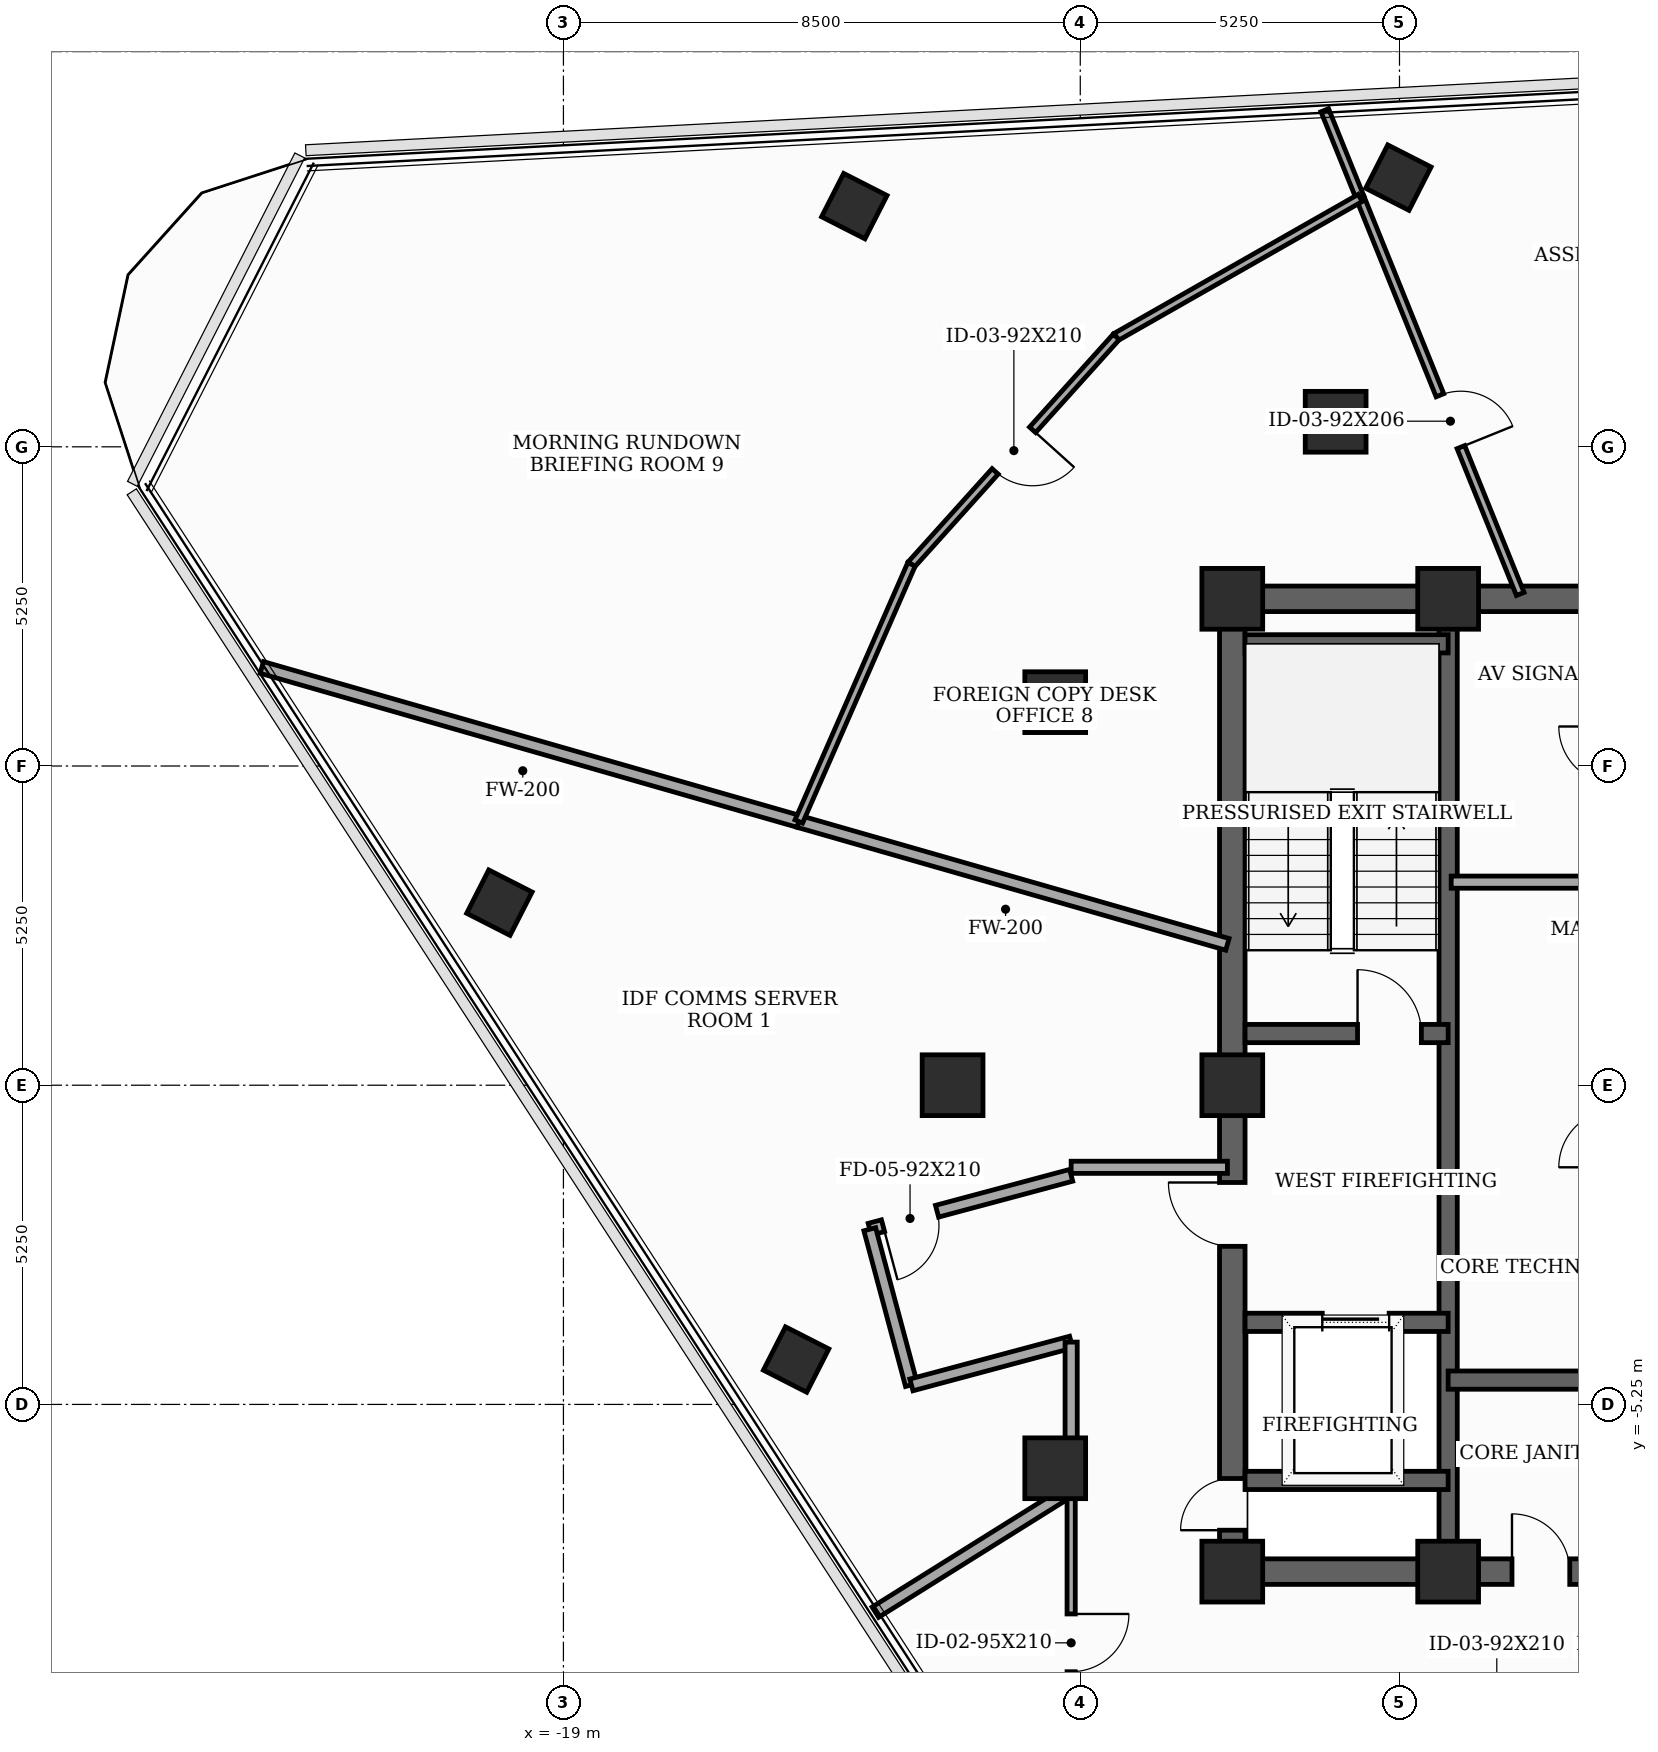
"""IFC4 building model, lengths in metres.
Left out: names, types, materials, properties, quantities, classifications, styles, units other than length and angle.
Written with IfcOpenShell. Run it as: python <this file> out.ifc"""

import sys

from ifc_helpers import new_model, si_unit, direction, frame, frame_2d, origin, origin_2d, place, context, subcontext, project, spatial, rectangle, extrude, element, fill, save


model = new_model("IFC4")
c1 = context("Model", 3, precision=1e-05, world=origin(), true_north=direction((0.0, 1.0)))
c2 = subcontext(c1, "Body", "Model", "MODEL_VIEW")
j1 = project(units=[si_unit("LENGTHUNIT", "METRE"), si_unit("PLANEANGLEUNIT", "RADIAN")], contexts=[c1])
p1 = place(None, origin())
s1 = spatial("IfcSite", under=j1, at=p1, CompositionType="ELEMENT")
p2 = place(p1, origin())
s2 = spatial("IfcBuilding", under=s1, at=p2, CompositionType="ELEMENT")
p3 = place(p2, frame((0.0, 0.0, 267.0)))
s3 = spatial("IfcBuildingStorey", under=s2, at=p3, CompositionType="ELEMENT", Elevation=267.0)
for number, where, z_axis, x_axis in (
    (1, (-8.0, -8.0, 0.0), (0.0, 0.0, 1.0), (1.0, 0.0, 0.0)),
    (2, (-4.45, -8.0, 0.0), (0.0, 0.0, 1.0), (1.0, 0.0, 0.0)),
    (3, (-4.45, 8.0, 0.0), (0.0, 0.0, 1.0), (1.0, 0.0, 0.0)),
    (4, (-8.0, 8.0, 0.0), (0.0, 0.0, 1.0), (1.0, 0.0, 0.0)),
    (5, (-8.0, 0.0, 0.0), (0.0, 0.0, 1.0), (1.0, 0.0, 0.0)),
    (6, (-6.3, 10.912, 0.0), (0.0, 0.0, 1.0), (1.0, 0.0, 0.0)),
    (7, (-10.912, 6.3, 0.0), (0.0, 0.0, 1.0), (1.0, 0.0, 0.0)),
    (8, (-12.6, 0.0, 0.0), (0.0, 0.0, 1.0), (1.0, 0.0, 0.0)),
    (9, (-10.912, -6.3, 0.0), (0.0, 0.0, 1.0), (1.0, 0.0, 0.0)),
):
    element("IfcColumn", number, at=place(p3, frame(where, z_axis=z_axis, x_axis=x_axis)), inside=s3, PredefinedType="COLUMN", context=c2, shape_type="SweptSolid", body=[
        extrude(rectangle(XDim=1.0, YDim=1.0, at=origin_2d()), origin(), (0.0, 0.0, 1.0), 3.7),
    ])
for number, where, z_axis, x_axis in (
    (10, (-5.269, 14.927, 0.0), (0.0, 0.0, 1.0), (0.454, 0.891, 0.0)),
    (11, (-14.216, 14.458, 0.0), (0.0, 0.0, 1.0), (0.454, 0.891, 0.0)),
    (12, (-20.053, 3.003, 0.0), (0.0, 0.0, 1.0), (0.454, 0.891, 0.0)),
    (13, (-15.173, -4.512, 0.0), (0.0, 0.0, 1.0), (0.454, 0.891, 0.0)),
):
    element("IfcColumn", number, at=place(p3, frame(where, z_axis=z_axis, x_axis=x_axis)), inside=s3, PredefinedType="COLUMN", context=c2, shape_type="SweptSolid", body=[
        extrude(rectangle(XDim=0.8, YDim=0.8, at=origin_2d()), origin(), (0.0, 0.0, 1.0), 3.7),
    ])
p4 = place(p3, frame((-8.0, -8.0, 0.0), z_axis=(0.0, 0.0, 1.0), x_axis=(0.0, 1.0, 0.0)))
e14 = element("IfcWall", 14, at=p4, inside=s3, PredefinedType="SHEAR", context=c2, shape_type="SweptSolid", body=[
    extrude(rectangle(XDim=16.0, YDim=0.42, at=frame_2d((8.0, 0.0))), origin(), (0.0, 0.0, 1.0), 3.5),
])
p5 = place(p4, frame((0.681, 0.0, 0.0)))
e15 = element("IfcOpeningElement", 15, at=p5, cuts=e14, PredefinedType="OPENING", context=c2, shape_type="SweptSolid", body=[
    extrude(rectangle(XDim=0.85, YDim=2.02, at=frame_2d((0.425, 1.01))), frame((0.0, 0.22, 0.0), z_axis=(0.0, -1.0, 0.0), x_axis=(1.0, 0.0, 0.0)), (0.0, 0.0, 1.0), 0.44),
])
p6 = place(p4, frame((5.35, 0.0, 0.0)))
e16 = element("IfcOpeningElement", 16, at=p6, cuts=e14, PredefinedType="OPENING", context=c2, shape_type="SweptSolid", body=[
    extrude(rectangle(XDim=1.05, YDim=2.15, at=frame_2d((0.525, 1.075))), frame((0.0, 0.22, 0.0), z_axis=(0.0, -1.0, 0.0), x_axis=(1.0, 0.0, 0.0)), (0.0, 0.0, 1.0), 0.44),
])
p7 = place(p3, frame((-8.0, -8.0, 0.0), z_axis=(0.0, 0.0, 1.0), x_axis=(1.0, 0.0, 0.0)))
e17 = element("IfcWall", 17, at=p7, inside=s3, PredefinedType="SHEAR", context=c2, shape_type="SweptSolid", body=[
    extrude(rectangle(XDim=16.0, YDim=0.42, at=frame_2d((8.0, 0.0))), origin(), (0.0, 0.0, 1.0), 3.5),
])
p8 = place(p7, frame((4.6, 0.0, 0.0)))
e18 = element("IfcOpeningElement", 18, at=p8, cuts=e17, PredefinedType="OPENING", context=c2, shape_type="SweptSolid", body=[
    extrude(rectangle(XDim=0.95, YDim=2.1, at=frame_2d((0.475, 1.05))), frame((0.0, 0.22, 0.0), z_axis=(0.0, -1.0, 0.0), x_axis=(1.0, 0.0, 0.0)), (0.0, 0.0, 1.0), 0.44),
])
p9 = place(p7, frame((7.52, 0.0, 0.0)))
e19 = element("IfcOpeningElement", 19, at=p9, cuts=e17, PredefinedType="OPENING", context=c2, shape_type="SweptSolid", body=[
    extrude(rectangle(XDim=0.95, YDim=2.1, at=frame_2d((0.475, 1.05))), frame((0.0, 0.22, 0.0), z_axis=(0.0, -1.0, 0.0), x_axis=(1.0, 0.0, 0.0)), (0.0, 0.0, 1.0), 0.44),
])
p10 = place(p7, frame((10.45, 0.0, 0.0)))
e20 = element("IfcOpeningElement", 20, at=p10, cuts=e17, PredefinedType="OPENING", context=c2, shape_type="SweptSolid", body=[
    extrude(rectangle(XDim=0.95, YDim=2.1, at=frame_2d((0.475, 1.05))), frame((0.0, 0.22, 0.0), z_axis=(0.0, -1.0, 0.0), x_axis=(1.0, 0.0, 0.0)), (0.0, 0.0, 1.0), 0.44),
])
p11 = place(p3, frame((-8.0, 8.0, 0.0), z_axis=(0.0, 0.0, 1.0), x_axis=(1.0, 0.0, 0.0)))
e21 = element("IfcWall", 21, at=p11, inside=s3, PredefinedType="SHEAR", context=c2, shape_type="SweptSolid", body=[
    extrude(rectangle(XDim=16.0, YDim=0.42, at=frame_2d((8.0, 0.0))), origin(), (0.0, 0.0, 1.0), 3.5),
])
p12 = place(p11, frame((7.1, 0.0, 0.0)))
e22 = element("IfcOpeningElement", 22, at=p12, cuts=e21, PredefinedType="OPENING", context=c2, shape_type="SweptSolid", body=[
    extrude(rectangle(XDim=1.8, YDim=2.15, at=frame_2d((0.9, 1.075))), frame((0.0, 0.22, 0.0), z_axis=(0.0, -1.0, 0.0), x_axis=(1.0, 0.0, 0.0)), (0.0, 0.0, 1.0), 0.44),
])
p13 = place(p3, frame((-4.45, -7.79, 0.0), z_axis=(0.0, 0.0, 1.0), x_axis=(0.0, 1.0, 0.0)))
e23 = element("IfcWall", 23, at=p13, inside=s3, PredefinedType="SHEAR", context=c2, shape_type="SweptSolid", body=[
    extrude(rectangle(XDim=15.58, YDim=0.3, at=frame_2d((7.79, 0.0))), origin(), (0.0, 0.0, 1.0), 3.5),
])
p14 = place(p3, frame((-7.79, 0.85, 0.0), z_axis=(0.0, 0.0, 1.0), x_axis=(1.0, 0.0, 0.0)))
e24 = element("IfcWall", 24, at=p14, inside=s3, PredefinedType="SHEAR", context=c2, shape_type="SweptSolid", body=[
    extrude(rectangle(XDim=3.34, YDim=0.3, at=frame_2d((1.67, 0.0))), origin(), (0.0, 0.0, 1.0), 3.5),
])
p15 = place(p14, frame((1.85, 0.0, 0.0)))
e25 = element("IfcOpeningElement", 25, at=p15, cuts=e24, PredefinedType="OPENING", context=c2, shape_type="SweptSolid", body=[
    extrude(rectangle(XDim=1.05, YDim=2.15, at=frame_2d((0.525, 1.075))), frame((0.0, 0.16, 0.0), z_axis=(0.0, -1.0, 0.0), x_axis=(1.0, 0.0, 0.0)), (0.0, 0.0, 1.0), 0.32),
])
p16 = place(p3, frame((-7.79, 7.26, 0.0), z_axis=(0.0, 0.0, 1.0), x_axis=(1.0, 0.0, 0.0)))
e26 = element("IfcWall", 26, at=p16, inside=s3, PredefinedType="SHEAR", context=c2, shape_type="SweptSolid", body=[
    extrude(rectangle(XDim=3.34, YDim=0.3, at=frame_2d((1.67, 0.0))), origin(), (0.0, 0.0, 1.0), 3.5),
])
p17 = place(p3, frame((-7.79, -3.9, 0.0), z_axis=(0.0, 0.0, 1.0), x_axis=(1.0, 0.0, 0.0)))
e27 = element("IfcWall", 27, at=p17, inside=s3, PredefinedType="SHEAR", context=c2, shape_type="SweptSolid", body=[
    extrude(rectangle(XDim=3.34, YDim=0.3, at=frame_2d((1.67, 0.0))), origin(), (0.0, 0.0, 1.0), 3.5),
])
p18 = place(p17, frame((1.27, 0.0, 0.0)))
e28 = element("IfcOpeningElement", 28, at=p18, cuts=e27, PredefinedType="OPENING", context=c2, shape_type="SweptSolid", body=[
    extrude(rectangle(XDim=1.1, YDim=2.1, at=frame_2d((0.55, 1.05))), frame((0.0, 0.16, 0.0), z_axis=(0.0, -1.0, 0.0), x_axis=(1.0, 0.0, 0.0)), (0.0, 0.0, 1.0), 0.32),
])
p19 = place(p3, frame((-7.79, -6.5, 0.0), z_axis=(0.0, 0.0, 1.0), x_axis=(1.0, 0.0, 0.0)))
e29 = element("IfcWall", 29, at=p19, inside=s3, PredefinedType="SHEAR", context=c2, shape_type="SweptSolid", body=[
    extrude(rectangle(XDim=3.34, YDim=0.3, at=frame_2d((1.67, 0.0))), origin(), (0.0, 0.0, 1.0), 3.5),
])
p20 = place(p3, frame((-4.45, -4.85, 0.0), z_axis=(0.0, 0.0, 1.0), x_axis=(1.0, 0.0, 0.0)))
e30 = element("IfcWall", 30, at=p20, inside=s3, PredefinedType="SHEAR", context=c2, shape_type="SweptSolid", body=[
    extrude(rectangle(XDim=8.9, YDim=0.3, at=frame_2d((4.45, 0.0))), origin(), (0.0, 0.0, 1.0), 3.5),
])
p21 = place(p3, frame((-4.4, 3.34, 0.0), z_axis=(0.0, 0.0, 1.0), x_axis=(1.0, 0.0, 0.0)))
e31 = element("IfcWall", 31, at=p21, inside=s3, PredefinedType="SOLIDWALL", context=c2, shape_type="SweptSolid", body=[
    extrude(rectangle(XDim=2.68, YDim=0.2, at=frame_2d((1.34, 0.0))), origin(), (0.0, 0.0, 1.0), 3.5),
])
p22 = place(p3, frame((-8.08, -1.35, 0.0), z_axis=(0.0, 0.0, 1.0), x_axis=(-1.0, 0.0, 0.0)))
e32 = element("IfcWall", 32, at=p22, inside=s3, PredefinedType="SOLIDWALL", context=c2, shape_type="SweptSolid", body=[
    extrude(rectangle(XDim=2.57, YDim=0.2, at=frame_2d((1.285, 0.0))), origin(), (0.0, 0.0, 1.0), 2.885),
])
p23 = place(p3, frame((-10.65, -1.482, 0.0), z_axis=(0.0, 0.0, 1.0), x_axis=(-0.965961397105, -0.2586862565, 0.0)))
e33 = element("IfcWall", 33, at=p23, inside=s3, PredefinedType="SOLIDWALL", context=c2, shape_type="SweptSolid", body=[
    extrude(rectangle(XDim=3.429, YDim=0.2, at=frame_2d((1.714, 0.0))), origin(), (0.0, 0.0, 1.0), 2.885),
])
p24 = place(p23, frame((2.283, 0.0, 0.0)))
e34 = element("IfcOpeningElement", 34, at=p24, cuts=e33, PredefinedType="OPENING", context=c2, shape_type="SweptSolid", body=[
    extrude(rectangle(XDim=0.92, YDim=2.1, at=frame_2d((0.46, 1.05))), frame((0.0, 0.11, 0.0), z_axis=(0.0, -1.0, 0.0), x_axis=(1.0, 0.0, 0.0)), (0.0, 0.0, 1.0), 0.22),
])
p25 = place(p3, frame((-13.962, -2.369, 0.0), z_axis=(0.0, 0.0, 1.0), x_axis=(0.258413725385, -0.966034340245, 0.0)))
e35 = element("IfcWall", 35, at=p25, inside=s3, PredefinedType="SOLIDWALL", context=c2, shape_type="SweptSolid", body=[
    extrude(rectangle(XDim=2.65, YDim=0.2, at=frame_2d((1.325, 0.0))), origin(), (0.0, 0.0, 1.0), 3.5),
])
p26 = place(p3, frame((-13.277, -4.929, 0.0), z_axis=(0.0, 0.0, 1.0), x_axis=(0.965934830229, 0.258785439601, 0.0)))
e36 = element("IfcWall", 36, at=p26, inside=s3, PredefinedType="SOLIDWALL", context=c2, shape_type="SweptSolid", body=[
    extrude(rectangle(XDim=2.72, YDim=0.2, at=frame_2d((1.36, 0.0))), origin(), (0.0, 0.0, 1.0), 2.885),
])
p27 = place(p3, frame((-10.65, -4.225, 0.0), z_axis=(0.0, 0.0, 1.0), x_axis=(0.0, -1.0, 0.0)))
e37 = element("IfcWall", 37, at=p27, inside=s3, PredefinedType="SOLIDWALL", context=c2, shape_type="SweptSolid", body=[
    extrude(rectangle(XDim=2.43, YDim=0.2, at=frame_2d((1.215, 0.0))), origin(), (0.0, 0.0, 1.0), 2.885),
])
p28 = place(p3, frame((-10.65, -6.655, 0.0), z_axis=(0.0, 0.0, 1.0), x_axis=(0.0, -1.0, 0.0)))
e38 = element("IfcWall", 38, at=p28, inside=s3, PredefinedType="PARTITIONING", context=c2, shape_type="SweptSolid", body=[
    extrude(rectangle(XDim=3.495, YDim=0.135, at=frame_2d((1.748, 0.0))), origin(), (0.0, 0.0, 1.0), 2.885),
])
p29 = place(p28, frame((2.042, 0.0, 0.0)))
e39 = element("IfcOpeningElement", 39, at=p29, cuts=e38, PredefinedType="OPENING", context=c2, shape_type="SweptSolid", body=[
    extrude(rectangle(XDim=0.95, YDim=2.1, at=frame_2d((0.475, 1.05))), frame((0.0, 0.077, 0.0), z_axis=(0.0, -1.0, 0.0), x_axis=(1.0, 0.0, 0.0)), (0.0, 0.0, 1.0), 0.155),
])
p30 = place(p3, frame((-13.87, -8.667, 0.0), z_axis=(0.0, 0.0, 1.0), x_axis=(0.848059708933, 0.529900679454, 0.0)))
e40 = element("IfcWall", 40, at=p30, inside=s3, PredefinedType="SOLIDWALL", context=c2, shape_type="SweptSolid", body=[
    extrude(rectangle(XDim=3.797, YDim=0.2, at=frame_2d((1.898, 0.0))), origin(), (0.0, 0.0, 1.0), 2.885),
])
p31 = place(p3, frame((-8.08, 2.317, 0.0), z_axis=(0.0, 0.0, 1.0), x_axis=(-0.961260926499, 0.275640039155, 0.0)))
e41 = element("IfcWall", 41, at=p31, inside=s3, PredefinedType="SOLIDWALL", context=c2, shape_type="SweptSolid", body=[
    extrude(rectangle(XDim=7.333, YDim=0.2, at=frame_2d((3.667, 0.0))), origin(), (0.0, 0.0, 1.0), 2.885),
])
p32 = place(p3, frame((-15.129, 4.338, 0.0), z_axis=(0.0, 0.0, 1.0), x_axis=(-0.96123865256, 0.275717704953, 0.0)))
e42 = element("IfcWall", 42, at=p32, inside=s3, PredefinedType="SOLIDWALL", context=c2, shape_type="SweptSolid", body=[
    extrude(rectangle(XDim=9.188, YDim=0.2, at=frame_2d((4.594, 0.0))), origin(), (0.0, 0.0, 1.0), 3.035),
])
p33 = place(p3, frame((-5.896, 14.593, 0.0), z_axis=(0.0, 0.0, 1.0), x_axis=(0.374630268076, -0.927174289032, 0.0)))
e43 = element("IfcWall", 43, at=p33, inside=s3, PredefinedType="PARTITIONING", context=c2, shape_type="SweptSolid", body=[
    extrude(rectangle(XDim=7.024, YDim=0.135, at=frame_2d((3.512, 0.0))), origin(), (0.0, 0.0, 1.0), 2.085),
])
p34 = place(p33, frame((3.5, 0.0, 0.0)))
e44 = element("IfcOpeningElement", 44, at=p34, cuts=e43, PredefinedType="OPENING", context=c2, shape_type="SweptSolid", body=[
    extrude(rectangle(XDim=0.92, YDim=2.035, at=frame_2d((0.46, 1.018))), frame((0.0, 0.077, 0.0), z_axis=(0.0, -1.0, 0.0), x_axis=(1.0, 0.0, 0.0)), (0.0, 0.0, 1.0), 0.155),
])
p35 = place(p3, frame((-6.479, 16.035, 0.0), z_axis=(0.0, 0.0, 1.0), x_axis=(0.374743256905, -0.927128627217, 0.0)))
e45 = element("IfcWall", 45, at=p35, inside=s3, PredefinedType="PARTITIONING", context=c2, shape_type="SweptSolid", body=[
    extrude(rectangle(XDim=1.556, YDim=0.135, at=frame_2d((0.778, 0.0))), origin(), (0.0, 0.0, 1.0), 3.025),
])
p36 = place(p3, frame((-5.896, 14.593, 0.0), z_axis=(0.0, 0.0, 1.0), x_axis=(-0.868954887981, -0.494891303877, 0.0)))
e46 = element("IfcWall", 46, at=p36, inside=s3, PredefinedType="PARTITIONING", context=c2, shape_type="SweptSolid", body=[
    extrude(rectangle(XDim=4.617, YDim=0.135, at=frame_2d((2.309, 0.0))), origin(), (0.0, 0.0, 1.0), 3.035),
])
p37 = place(p3, frame((-9.908, 12.308, 0.0), z_axis=(0.0, 0.0, 1.0), x_axis=(-0.669055831343, -0.743212146393, 0.0)))
e47 = element("IfcWall", 47, at=p37, inside=s3, PredefinedType="PARTITIONING", context=c2, shape_type="SweptSolid", body=[
    extrude(rectangle(XDim=5.034, YDim=0.135, at=frame_2d((2.517, 0.0))), origin(), (0.0, 0.0, 1.0), 3.035),
])
p38 = place(p37, frame((2.057, 0.0, 0.0)))
e48 = element("IfcOpeningElement", 48, at=p38, cuts=e47, PredefinedType="OPENING", context=c2, shape_type="SweptSolid", body=[
    extrude(rectangle(XDim=0.92, YDim=2.1, at=frame_2d((0.46, 1.05))), frame((0.0, 0.077, 0.0), z_axis=(0.0, -1.0, 0.0), x_axis=(1.0, 0.0, 0.0)), (0.0, 0.0, 1.0), 0.155),
])
p39 = place(p3, frame((-13.276, 8.567, 0.0), z_axis=(0.0, 0.0, 1.0), x_axis=(-0.401334709075, -0.915931466482, 0.0)))
e49 = element("IfcWall", 49, at=p39, inside=s3, PredefinedType="PARTITIONING", context=c2, shape_type="SweptSolid", body=[
    extrude(rectangle(XDim=4.617, YDim=0.135, at=frame_2d((2.309, 0.0))), origin(), (0.0, 0.0, 1.0), 3.185),
])
p40 = place(p5, origin())
e50 = element("IfcDoor", 50, at=p40, inside=s3, OperationType="SINGLE_SWING_LEFT", PredefinedType="TRAPDOOR", context=c2, shape_type="SweptSolid", body=[
    extrude(rectangle(XDim=0.85, YDim=2.02, at=frame_2d((0.425, 1.01))), frame((0.0, 0.025, 0.0), z_axis=(0.0, -1.0, 0.0), x_axis=(1.0, 0.0, 0.0)), (0.0, 0.0, 1.0), 0.05),
])
fill(e15, e50)
p41 = place(p6, origin())
e51 = element("IfcDoor", 51, at=p41, inside=s3, OperationType="SINGLE_SWING_RIGHT", PredefinedType="DOOR", context=c2, shape_type="SweptSolid", body=[
    extrude(rectangle(XDim=1.05, YDim=2.15, at=frame_2d((0.525, 1.075))), frame((0.0, 0.025, 0.0), z_axis=(0.0, -1.0, 0.0), x_axis=(1.0, 0.0, 0.0)), (0.0, 0.0, 1.0), 0.05),
])
fill(e16, e51)
p42 = place(p8, origin())
e52 = element("IfcDoor", 52, at=p42, inside=s3, OperationType="SINGLE_SWING_LEFT", PredefinedType="DOOR", context=c2, shape_type="SweptSolid", body=[
    extrude(rectangle(XDim=0.95, YDim=2.1, at=frame_2d((0.475, 1.05))), frame((0.0, 0.025, 0.0), z_axis=(0.0, -1.0, 0.0), x_axis=(1.0, 0.0, 0.0)), (0.0, 0.0, 1.0), 0.05),
])
fill(e18, e52)
p43 = place(p15, origin())
e53 = element("IfcDoor", 53, at=p43, inside=s3, OperationType="SINGLE_SWING_LEFT", PredefinedType="DOOR", context=c2, shape_type="SweptSolid", body=[
    extrude(rectangle(XDim=1.05, YDim=2.15, at=frame_2d((0.525, 1.075))), frame((0.0, 0.025, 0.0), z_axis=(0.0, -1.0, 0.0), x_axis=(1.0, 0.0, 0.0)), (0.0, 0.0, 1.0), 0.05),
])
fill(e25, e53)
p44 = place(p18, origin())
e54 = element("IfcDoor", 54, at=p44, inside=s3, OperationType="SLIDING_TO_LEFT", PredefinedType="DOOR", context=c2, shape_type="SweptSolid", body=[
    extrude(rectangle(XDim=1.1, YDim=2.1, at=frame_2d((0.55, 1.05))), frame((0.0, 0.025, 0.0), z_axis=(0.0, -1.0, 0.0), x_axis=(1.0, 0.0, 0.0)), (0.0, 0.0, 1.0), 0.05),
])
fill(e28, e54)
p45 = place(p24, origin())
e55 = element("IfcDoor", 55, at=p45, inside=s3, OperationType="SINGLE_SWING_RIGHT", PredefinedType="DOOR", context=c2, shape_type="SweptSolid", body=[
    extrude(rectangle(XDim=0.92, YDim=2.1, at=frame_2d((0.46, 1.05))), frame((0.0, 0.025, 0.0), z_axis=(0.0, -1.0, 0.0), x_axis=(1.0, 0.0, 0.0)), (0.0, 0.0, 1.0), 0.05),
])
fill(e34, e55)
p46 = place(p29, origin())
e56 = element("IfcDoor", 56, at=p46, inside=s3, OperationType="SINGLE_SWING_LEFT", PredefinedType="DOOR", context=c2, shape_type="SweptSolid", body=[
    extrude(rectangle(XDim=0.95, YDim=2.1, at=frame_2d((0.475, 1.05))), frame((0.0, 0.025, 0.0), z_axis=(0.0, -1.0, 0.0), x_axis=(1.0, 0.0, 0.0)), (0.0, 0.0, 1.0), 0.05),
])
fill(e39, e56)
p47 = place(p34, origin())
e57 = element("IfcDoor", 57, at=p47, inside=s3, OperationType="SINGLE_SWING_RIGHT", PredefinedType="DOOR", context=c2, shape_type="SweptSolid", body=[
    extrude(rectangle(XDim=0.92, YDim=2.035, at=frame_2d((0.46, 1.018))), frame((0.0, 0.025, 0.0), z_axis=(0.0, -1.0, 0.0), x_axis=(1.0, 0.0, 0.0)), (0.0, 0.0, 1.0), 0.05),
])
fill(e44, e57)
p48 = place(p38, origin())
e58 = element("IfcDoor", 58, at=p48, inside=s3, OperationType="SINGLE_SWING_LEFT", PredefinedType="DOOR", context=c2, shape_type="SweptSolid", body=[
    extrude(rectangle(XDim=0.92, YDim=2.1, at=frame_2d((0.46, 1.05))), frame((0.0, 0.025, 0.0), z_axis=(0.0, -1.0, 0.0), x_axis=(1.0, 0.0, 0.0)), (0.0, 0.0, 1.0), 0.05),
])
fill(e48, e58)
save(model, sys.argv[1])
